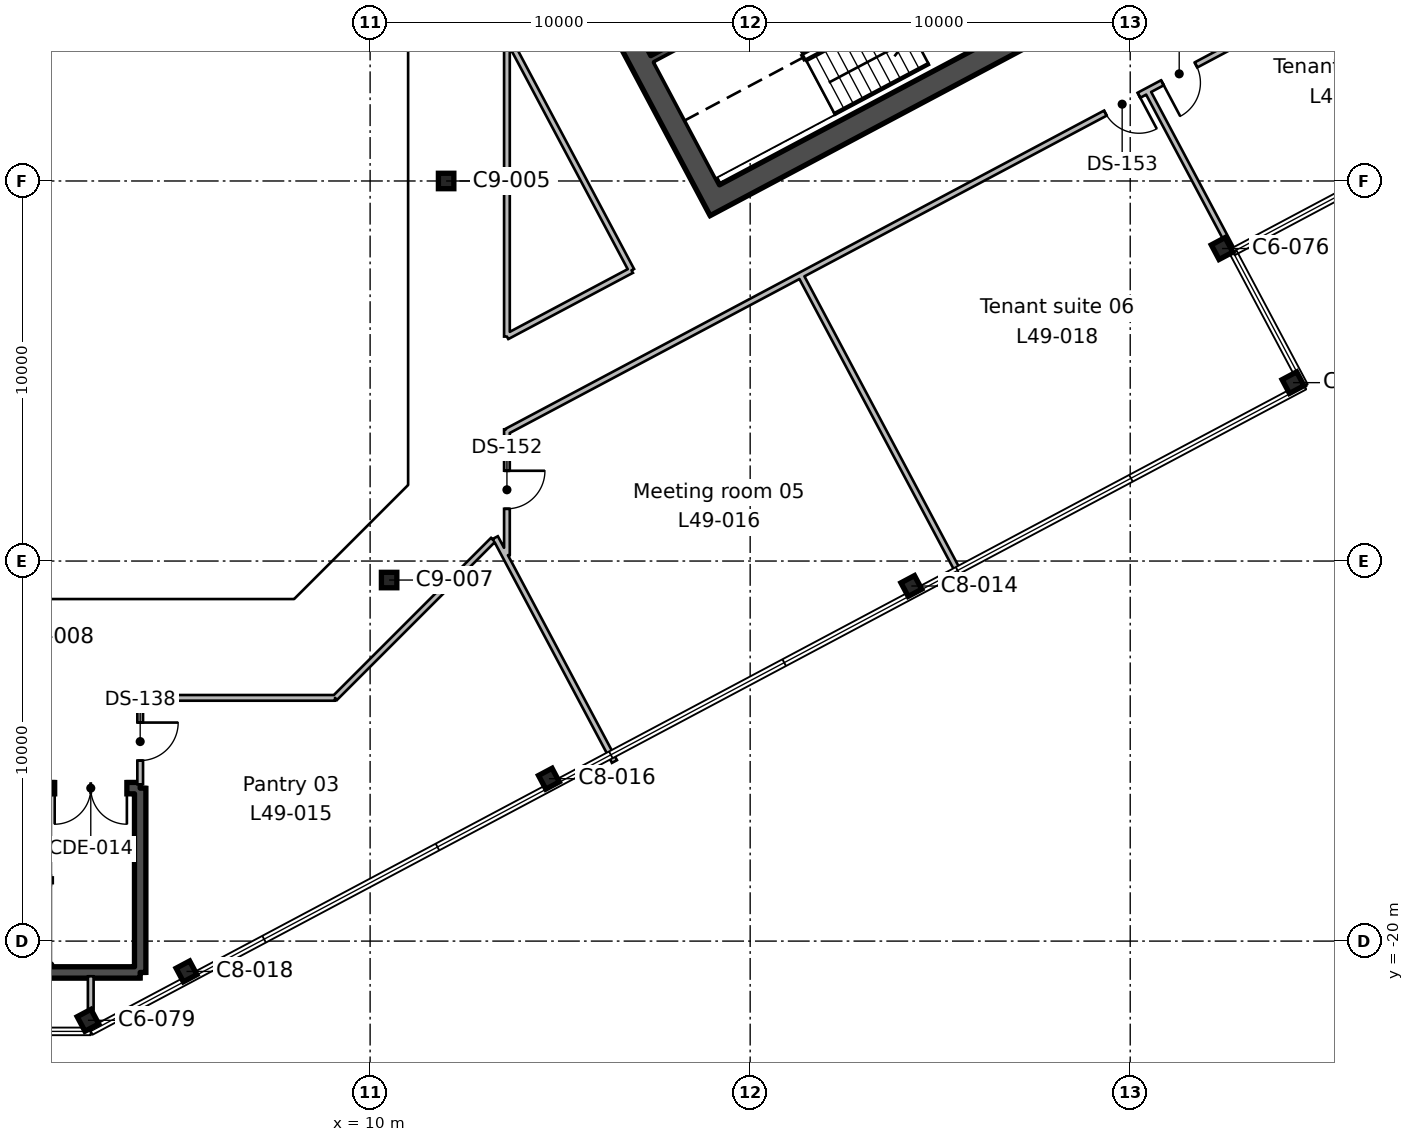
"""IFC4 building model, lengths in metres.
Left out: names, types, materials, properties, quantities, classifications, styles, units other than length and angle.
Written with IfcOpenShell. Run it as: python <this file> out.ifc"""

import sys

from ifc_helpers import new_model, si_unit, direction, frame, frame_2d, origin, origin_2d, place, context, subcontext, project, spatial, rectangle, hollow_rectangle, i_section, extrude, element, fill, save


model = new_model("IFC4")
c1 = context("Model", 3, precision=1e-05, world=origin(), true_north=direction((0.0, 1.0)))
c2 = subcontext(c1, "Body", "Model", "MODEL_VIEW")
j1 = project(units=[si_unit("LENGTHUNIT", "METRE"), si_unit("PLANEANGLEUNIT", "RADIAN")], contexts=[c1])
p1 = place(None, origin())
s1 = spatial("IfcSite", under=j1, at=p1, CompositionType="ELEMENT")
p2 = place(p1, origin())
s2 = spatial("IfcBuilding", under=s1, at=p2, CompositionType="ELEMENT")
p3 = place(p2, frame((0.0, 0.0, 224.7)))
s3 = spatial("IfcBuildingStorey", under=s2, at=p3, CompositionType="ELEMENT", Elevation=224.7)
p4 = place(p3, frame((2.576, -22.084, 0.0), z_axis=(0.0, 0.0, 1.0), x_axis=(0.882947592859, 0.469471562786, 0.0)))
e1 = element("IfcColumn", 1, at=p4, inside=s3, PredefinedType="COLUMN", context=c2, shape_type="SweptSolid", body=[
    extrude(i_section(OverallWidth=0.412, OverallDepth=0.434, WebThickness=0.036, FlangeThickness=0.057, FilletRadius=0.015, at=origin_2d()), origin(), (0.0, 0.0, 1.0), 3.9),
])
for number, where, z_axis, x_axis in (
    (2, (5.169, -20.798, 0.0), (0.0, 0.0, 1.0), (0.883, 0.469, 0.0)),
    (3, (14.705, -15.727, 0.0), (0.0, 0.0, 1.0), (0.883, 0.469, 0.0)),
    (4, (24.241, -10.657, 0.0), (0.0, 0.0, 1.0), (0.883, 0.469, 0.0)),
):
    element("IfcColumn", number, at=place(p3, frame(where, z_axis=z_axis, x_axis=x_axis)), inside=s3, PredefinedType="COLUMN", context=c2, shape_type="SweptSolid", body=[
        extrude(i_section(OverallWidth=0.404, OverallDepth=0.406, WebThickness=0.027, FlangeThickness=0.044, FilletRadius=0.015, at=origin_2d()), origin(), (0.0, 0.0, 1.0), 3.9),
    ])
p5 = place(p3, frame((10.5, -10.5, 0.0), z_axis=(0.0, 0.0, 1.0), x_axis=(1.0, 0.0, 0.0)))
e5 = element("IfcColumn", 5, at=p5, inside=s3, PredefinedType="COLUMN", context=c2, shape_type="SweptSolid", body=[
    extrude(hollow_rectangle(XDim=0.406, YDim=0.406, WallThickness=0.015, InnerFilletRadius=0.007, OuterFilletRadius=0.022, at=origin_2d()), origin(), (0.0, 0.0, 1.0), 3.9),
])
for number, where, z_axis, x_axis in (
    (6, (34.285, -5.306, 0.0), (0.0, 0.0, 1.0), (-0.469, 0.883, 0.0)),
    (7, (32.417, -1.777, 0.0), (0.0, 0.0, 1.0), (0.883, 0.469, 0.0)),
):
    element("IfcColumn", number, at=place(p3, frame(where, z_axis=z_axis, x_axis=x_axis)), inside=s3, PredefinedType="COLUMN", context=c2, shape_type="SweptSolid", body=[
        extrude(i_section(OverallWidth=0.412, OverallDepth=0.434, WebThickness=0.036, FlangeThickness=0.057, FilletRadius=0.015, at=origin_2d()), origin(), (0.0, 0.0, 1.0), 3.9),
    ])
p6 = place(p3, frame((12.0, 0.0, 0.0), z_axis=(0.0, 0.0, 1.0), x_axis=(1.0, 0.0, 0.0)))
e8 = element("IfcColumn", 8, at=p6, inside=s3, PredefinedType="COLUMN", context=c2, shape_type="SweptSolid", body=[
    extrude(hollow_rectangle(XDim=0.406, YDim=0.406, WallThickness=0.015, InnerFilletRadius=0.007, OuterFilletRadius=0.022, at=origin_2d()), origin(), (0.0, 0.0, 1.0), 3.9),
])
p7 = place(p3, frame((19.211, -0.771, 0.0), z_axis=(0.0, 0.0, 1.0), x_axis=(-0.469463742137, 0.882951751127, 0.0)))
e9 = element("IfcWall", 9, at=p7, inside=s3, PredefinedType="SHEAR", context=c2, shape_type="SweptSolid", body=[
    extrude(rectangle(XDim=19.4, YDim=0.6, at=frame_2d((9.7, 0.0))), origin(), (0.0, 0.0, 1.0), 3.9),
])
p8 = place(p7, frame((6.7, 0.0, 0.0)))
e10 = element("IfcOpeningElement", 10, at=p8, cuts=e9, PredefinedType="OPENING", context=c2, shape_type="SweptSolid", body=[
    extrude(rectangle(XDim=2.4, YDim=2.4, at=frame_2d((1.2, 1.2))), frame((0.0, 0.31, 0.0), z_axis=(0.0, -1.0, 0.0), x_axis=(1.0, 0.0, 0.0)), (0.0, 0.0, 1.0), 0.62),
])
p9 = place(p3, frame((19.335, -0.366, 0.0), z_axis=(0.0, 0.0, 1.0), x_axis=(0.88294509198, 0.469476266226, 0.0)))
e11 = element("IfcWall", 11, at=p9, inside=s3, PredefinedType="SHEAR", context=c2, shape_type="SweptSolid", body=[
    extrude(rectangle(XDim=20.2, YDim=0.6, at=frame_2d((10.1, 0.0))), origin(), (0.0, 0.0, 1.0), 3.9),
])
p10 = place(p3, frame((17.434, 3.21, 0.0), z_axis=(0.0, 0.0, 1.0), x_axis=(0.882940221191, 0.469485426614, 0.0)))
e12 = element("IfcWall", 12, at=p10, inside=s3, PredefinedType="SHEAR", context=c2, shape_type="SweptSolid", body=[
    extrude(rectangle(XDim=8.0, YDim=0.2, at=frame_2d((4.0, 0.0))), origin(), (0.0, 0.0, 1.0), 3.9),
])
p11 = place(p3, frame((3.95, -15.975, 0.0), z_axis=(0.0, 0.0, 1.0), x_axis=(0.0, -1.0, 0.0)))
e13 = element("IfcWall", 13, at=p11, inside=s3, PredefinedType="SHEAR", context=c2, shape_type="SweptSolid", body=[
    extrude(rectangle(XDim=4.85, YDim=0.3, at=frame_2d((2.425, 0.0))), origin(), (0.0, 0.0, 1.0), 3.9),
])
p12 = place(p3, frame((3.95, -20.825, 0.0), z_axis=(0.0, 0.0, 1.0), x_axis=(-1.0, 0.0, 0.0)))
e14 = element("IfcWall", 14, at=p12, inside=s3, PredefinedType="SHEAR", context=c2, shape_type="SweptSolid", body=[
    extrude(rectangle(XDim=8.3, YDim=0.3, at=frame_2d((4.15, 0.0))), origin(), (0.0, 0.0, 1.0), 3.9),
])
p13 = place(p3, frame((-4.35, -15.975, 0.0), z_axis=(0.0, 0.0, 1.0), x_axis=(1.0, 0.0, 0.0)))
e15 = element("IfcWall", 15, at=p13, inside=s3, PredefinedType="SHEAR", context=c2, shape_type="SweptSolid", body=[
    extrude(rectangle(XDim=8.3, YDim=0.3, at=frame_2d((4.15, 0.0))), origin(), (0.0, 0.0, 1.0), 3.9),
])
p14 = place(p13, frame((6.05, 0.0, 0.0)))
e16 = element("IfcOpeningElement", 16, at=p14, cuts=e15, PredefinedType="OPENING", context=c2, shape_type="SweptSolid", body=[
    extrude(rectangle(XDim=1.9, YDim=2.1, at=frame_2d((0.95, 1.05))), frame((0.0, 0.16, 0.0), z_axis=(0.0, -1.0, 0.0), x_axis=(1.0, 0.0, 0.0)), (0.0, 0.0, 1.0), 0.32),
])
p15 = place(p3, frame((2.649, -21.799, 0.0), z_axis=(0.0, 0.0, 1.0), x_axis=(0.0, 1.0, 0.0)))
e17 = element("IfcWall", 17, at=p15, inside=s3, PredefinedType="PARTITIONING", context=c2, shape_type="SweptSolid", body=[
    extrude(rectangle(XDim=0.874, YDim=0.15, at=frame_2d((0.437, 0.0))), origin(), (0.0, 0.0, 1.0), 3.54),
])
p16 = place(p3, frame((3.95, -13.6, 0.0), z_axis=(0.0, 0.0, 1.0), x_axis=(0.0, -1.0, 0.0)))
e18 = element("IfcWall", 18, at=p16, inside=s3, PredefinedType="PARTITIONING", context=c2, shape_type="SweptSolid", body=[
    extrude(rectangle(XDim=2.275, YDim=0.15, at=frame_2d((1.137, 0.0))), origin(), (0.0, 0.0, 1.0), 3.54),
])
p17 = place(p16, frame((0.65, 0.0, 0.0)))
e19 = element("IfcOpeningElement", 19, at=p17, cuts=e18, PredefinedType="OPENING", context=c2, shape_type="SweptSolid", body=[
    extrude(rectangle(XDim=1.0, YDim=2.1, at=frame_2d((0.5, 1.05))), frame((0.0, 0.085, 0.0), z_axis=(0.0, -1.0, 0.0), x_axis=(1.0, 0.0, 0.0)), (0.0, 0.0, 1.0), 0.17),
])
p18 = place(p3, frame((13.233, -9.444, 0.0), z_axis=(0.0, 0.0, 1.0), x_axis=(-0.707106781187, -0.707106781187, 0.0)))
e20 = element("IfcWall", 20, at=p18, inside=s3, PredefinedType="PARTITIONING", context=c2, shape_type="SweptSolid", body=[
    extrude(rectangle(XDim=5.877, YDim=0.15, at=frame_2d((2.939, 0.0))), origin(), (0.0, 0.0, 1.0), 3.54),
])
p19 = place(p3, frame((9.077, -13.6, 0.0), z_axis=(0.0, 0.0, 1.0), x_axis=(-1.0, 0.0, 0.0)))
e21 = element("IfcWall", 21, at=p19, inside=s3, PredefinedType="PARTITIONING", context=c2, shape_type="SweptSolid", body=[
    extrude(rectangle(XDim=5.052, YDim=0.15, at=frame_2d((2.526, 0.0))), origin(), (0.0, 0.0, 1.0), 3.54),
])
p20 = place(p3, frame((13.295, -9.382, 0.0), z_axis=(0.0, 0.0, 1.0), x_axis=(0.469560801687, -0.882900137908, 0.0)))
e22 = element("IfcWall", 22, at=p20, inside=s3, PredefinedType="PARTITIONING", context=c2, shape_type="SweptSolid", body=[
    extrude(rectangle(XDim=6.674, YDim=0.15, at=frame_2d((3.337, 0.0))), origin(), (0.0, 0.0, 1.0), 3.54),
])
p21 = place(p3, frame((13.6, -6.536, 0.0), z_axis=(0.0, 0.0, 1.0), x_axis=(0.0, -1.0, 0.0)))
e23 = element("IfcWall", 23, at=p21, inside=s3, PredefinedType="PARTITIONING", context=c2, shape_type="SweptSolid", body=[
    extrude(rectangle(XDim=3.31, YDim=0.15, at=frame_2d((1.655, 0.0))), origin(), (0.0, 0.0, 1.0), 3.54),
])
p22 = place(p21, frame((1.089, 0.0, 0.0)))
e24 = element("IfcOpeningElement", 24, at=p22, cuts=e23, PredefinedType="OPENING", context=c2, shape_type="SweptSolid", body=[
    extrude(rectangle(XDim=1.0, YDim=2.1, at=frame_2d((0.5, 1.05))), frame((0.0, 0.085, 0.0), z_axis=(0.0, -1.0, 0.0), x_axis=(1.0, 0.0, 0.0)), (0.0, 0.0, 1.0), 0.17),
])
p23 = place(p3, frame((21.327, -2.478, 0.0), z_axis=(0.0, 0.0, 1.0), x_axis=(0.469481145989, -0.882942497313, 0.0)))
e25 = element("IfcWall", 25, at=p23, inside=s3, PredefinedType="PARTITIONING", context=c2, shape_type="SweptSolid", body=[
    extrude(rectangle(XDim=9.0, YDim=0.15, at=frame_2d((4.5, 0.0))), origin(), (0.0, 0.0, 1.0), 3.54),
])
p24 = place(p3, frame((48.286, 11.856, 0.0), z_axis=(0.0, 0.0, 1.0), x_axis=(-0.882956748566, -0.469454343001, 0.0)))
e26 = element("IfcWall", 26, at=p24, inside=s3, PredefinedType="PARTITIONING", context=c2, shape_type="SweptSolid", body=[
    extrude(rectangle(XDim=39.284, YDim=0.15, at=frame_2d((19.642, 0.0))), origin(), (0.0, 0.0, 1.0), 3.54),
])
p25 = place(p24, frame((20.45, 0.0, 0.0)))
e27 = element("IfcOpeningElement", 27, at=p25, cuts=e26, PredefinedType="OPENING", context=c2, shape_type="SweptSolid", body=[
    extrude(rectangle(XDim=1.0, YDim=2.1, at=frame_2d((0.5, 1.05))), frame((0.0, 0.085, 0.0), z_axis=(0.0, -1.0, 0.0), x_axis=(1.0, 0.0, 0.0)), (0.0, 0.0, 1.0), 0.17),
])
p26 = place(p24, frame((18.75, 0.0, 0.0)))
e28 = element("IfcOpeningElement", 28, at=p26, cuts=e26, PredefinedType="OPENING", context=c2, shape_type="SweptSolid", body=[
    extrude(rectangle(XDim=1.0, YDim=2.1, at=frame_2d((0.5, 1.05))), frame((0.0, 0.085, 0.0), z_axis=(0.0, -1.0, 0.0), x_axis=(1.0, 0.0, 0.0)), (0.0, 0.0, 1.0), 0.17),
])
p27 = place(p3, frame((30.45, 2.373, 0.0), z_axis=(0.0, 0.0, 1.0), x_axis=(0.469577911111, -0.882891038235, 0.0)))
e29 = element("IfcWall", 29, at=p27, inside=s3, PredefinedType="PARTITIONING", context=c2, shape_type="SweptSolid", body=[
    extrude(rectangle(XDim=5.081, YDim=0.15, at=frame_2d((2.541, 0.0))), origin(), (0.0, 0.0, 1.0), 3.54),
])
p28 = place(p3, frame((16.879, -2.351, 0.0), z_axis=(0.0, 0.0, 1.0), x_axis=(-0.469386900786, 0.882992603236, 0.0)))
e30 = element("IfcWall", 30, at=p28, inside=s3, PredefinedType="PARTITIONING", context=c2, shape_type="SweptSolid", body=[
    extrude(rectangle(XDim=6.985, YDim=0.15, at=frame_2d((3.493, 0.0))), origin(), (0.0, 0.0, 1.0), 3.54),
])
p29 = place(p3, frame((13.6, 3.817, 0.0), z_axis=(0.0, 0.0, 1.0), x_axis=(0.0, -1.0, 0.0)))
e31 = element("IfcWall", 31, at=p29, inside=s3, PredefinedType="PARTITIONING", context=c2, shape_type="SweptSolid", body=[
    extrude(rectangle(XDim=7.911, YDim=0.15, at=frame_2d((3.956, 0.0))), origin(), (0.0, 0.0, 1.0), 3.54),
])
p30 = place(p3, frame((13.6, -4.094, 0.0), z_axis=(0.0, 0.0, 1.0), x_axis=(0.882998216328, 0.469376341502, 0.0)))
e32 = element("IfcWall", 32, at=p30, inside=s3, PredefinedType="PARTITIONING", context=c2, shape_type="SweptSolid", body=[
    extrude(rectangle(XDim=3.713, YDim=0.15, at=frame_2d((1.857, 0.0))), origin(), (0.0, 0.0, 1.0), 3.54),
])
p31 = place(p14, frame((1.9, 0.0, 0.0), z_axis=(0.0, 0.0, 1.0), x_axis=(-1.0, 0.0, 0.0)))
e33 = element("IfcDoor", 33, at=p31, inside=s3, OperationType="DOUBLE_DOOR_SINGLE_SWING", PredefinedType="DOOR", context=c2, shape_type="SweptSolid", body=[
    extrude(rectangle(XDim=1.9, YDim=2.1, at=frame_2d((0.95, 1.05))), frame((0.0, 0.025, 0.0), z_axis=(0.0, -1.0, 0.0), x_axis=(1.0, 0.0, 0.0)), (0.0, 0.0, 1.0), 0.05),
])
fill(e16, e33)
p32 = place(p17, origin())
e34 = element("IfcDoor", 34, at=p32, inside=s3, OperationType="SINGLE_SWING_LEFT", PredefinedType="DOOR", context=c2, shape_type="SweptSolid", body=[
    extrude(rectangle(XDim=1.0, YDim=2.1, at=frame_2d((0.5, 1.05))), frame((0.0, 0.025, 0.0), z_axis=(0.0, -1.0, 0.0), x_axis=(1.0, 0.0, 0.0)), (0.0, 0.0, 1.0), 0.05),
])
fill(e19, e34)
p33 = place(p22, origin())
e35 = element("IfcDoor", 35, at=p33, inside=s3, OperationType="SINGLE_SWING_LEFT", PredefinedType="DOOR", context=c2, shape_type="SweptSolid", body=[
    extrude(rectangle(XDim=1.0, YDim=2.1, at=frame_2d((0.5, 1.05))), frame((0.0, 0.025, 0.0), z_axis=(0.0, -1.0, 0.0), x_axis=(1.0, 0.0, 0.0)), (0.0, 0.0, 1.0), 0.05),
])
fill(e24, e35)
p34 = place(p25, origin())
e36 = element("IfcDoor", 36, at=p34, inside=s3, OperationType="SINGLE_SWING_LEFT", PredefinedType="DOOR", context=c2, shape_type="SweptSolid", body=[
    extrude(rectangle(XDim=1.0, YDim=2.1, at=frame_2d((0.5, 1.05))), frame((0.0, 0.025, 0.0), z_axis=(0.0, -1.0, 0.0), x_axis=(1.0, 0.0, 0.0)), (0.0, 0.0, 1.0), 0.05),
])
fill(e27, e36)
p35 = place(p26, origin())
e37 = element("IfcDoor", 37, at=p35, inside=s3, OperationType="SINGLE_SWING_RIGHT", PredefinedType="DOOR", context=c2, shape_type="SweptSolid", body=[
    extrude(rectangle(XDim=1.0, YDim=2.1, at=frame_2d((0.5, 1.05))), frame((0.0, 0.025, 0.0), z_axis=(0.0, -1.0, 0.0), x_axis=(1.0, 0.0, 0.0)), (0.0, 0.0, 1.0), 0.05),
])
fill(e28, e37)
save(model, sys.argv[1])
